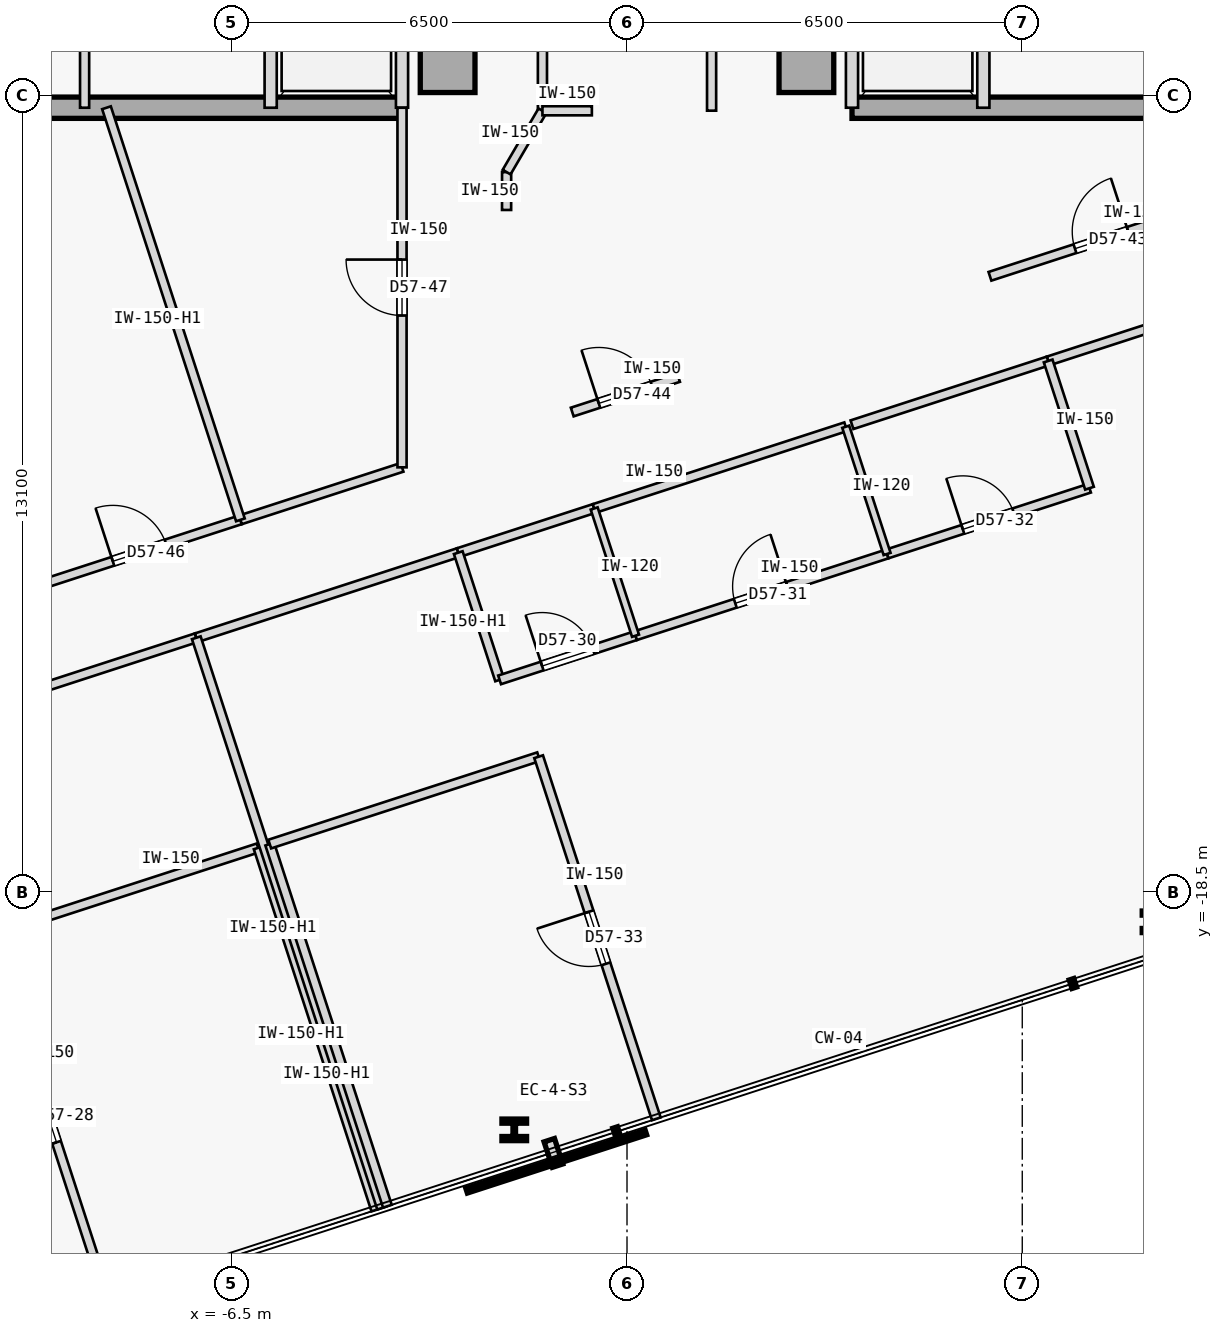
"""IFC4 building model, lengths in metres.
Left out: names, types, materials, properties, quantities, classifications, styles, units other than length and angle.
Written with IfcOpenShell. Run it as: python <this file> out.ifc"""

import sys

from ifc_helpers import new_model, si_unit, direction, frame, frame_2d, origin, origin_2d, place, context, subcontext, project, spatial, rectangle, i_section, extrude, element, fill, save


model = new_model("IFC4")
c1 = context("Model", 3, precision=1e-05, world=origin(), true_north=direction((0.0, 1.0)))
c2 = subcontext(c1, "Body", "Model", "MODEL_VIEW")
j1 = project(units=[si_unit("LENGTHUNIT", "METRE"), si_unit("PLANEANGLEUNIT", "RADIAN")], contexts=[c1])
p1 = place(None, origin())
s1 = spatial("IfcSite", under=j1, at=p1, CompositionType="ELEMENT")
p2 = place(p1, origin())
s2 = spatial("IfcBuilding", under=s1, at=p2, CompositionType="ELEMENT")
p3 = place(p2, frame((0.0, 0.0, 217.6)))
s3 = spatial("IfcBuildingStorey", under=s2, at=p3, CompositionType="ELEMENT", Elevation=217.6)
for number, where, z_axis, x_axis in (
    (1, (-2.95, -4.9, 0.0), (0.0, 0.0, 1.0), (1.0, 0.0, 0.0)),
    (2, (2.95, -4.9, 0.0), (0.0, 0.0, 1.0), (1.0, 0.0, 0.0)),
):
    element("IfcColumn", number, at=place(p3, frame(where, z_axis=z_axis, x_axis=x_axis)), inside=s3, PredefinedType="COLUMN", context=c2, shape_type="SweptSolid", body=[
        extrude(rectangle(XDim=0.9, YDim=0.9, at=origin_2d()), origin(), (0.0, 0.0, 1.0), 3.35),
    ])
for number, where, z_axis, x_axis in (
    (3, (-14.56, -5.6, 0.0), (0.0, 0.0, 1.0), (1.0, 0.0, 0.0)),
    (4, (3.7, -5.6, 0.0), (0.0, 0.0, 1.0), (1.0, 0.0, 0.0)),
):
    element("IfcWall", number, at=place(p3, frame(where, z_axis=z_axis, x_axis=x_axis)), inside=s3, PredefinedType="SHEAR", context=c2, shape_type="SweptSolid", body=[
        extrude(rectangle(XDim=10.86, YDim=0.35, at=frame_2d((5.43, 0.0))), origin(), (0.0, 0.0, 1.0), 3.125),
    ])
for number, where, z_axis, x_axis in (
    (5, (-1.854, -22.409, 0.0), (0.0, 0.0, 1.0), (1.0, 0.0, 0.0)),
    (6, (8.675, -18.988, 0.0), (0.0, 0.0, 1.0), (1.0, 0.0, 0.0)),
):
    element("IfcColumn", number, at=place(p3, frame(where, z_axis=z_axis, x_axis=x_axis)), inside=s3, PredefinedType="COLUMN", context=c2, shape_type="SweptSolid", body=[
        extrude(i_section(OverallWidth=0.405, OverallDepth=0.355, WebThickness=0.042, FlangeThickness=0.068, FilletRadius=0.015, at=origin_2d()), origin(), (0.0, 0.0, 1.0), 3.35),
    ])
for number, where, z_axis, x_axis in (
    (7, (-3.7, -5.6, 0.0), (0.0, 0.0, 1.0), (0.0, 1.0, 0.0)),
    (8, (-5.86, -5.6, 0.0), (0.0, 0.0, 1.0), (0.0, 1.0, 0.0)),
    (9, (3.7, -5.6, 0.0), (0.0, 0.0, 1.0), (0.0, 1.0, 0.0)),
    (10, (5.86, -5.6, 0.0), (0.0, 0.0, 1.0), (0.0, 1.0, 0.0)),
):
    element("IfcWall", number, at=place(p3, frame(where, z_axis=z_axis, x_axis=x_axis)), inside=s3, PredefinedType="STANDARD", context=c2, shape_type="SweptSolid", body=[
        extrude(rectangle(XDim=2.65, YDim=0.2, at=frame_2d((1.325, 0.0))), origin(), (0.0, 0.0, 1.0), 3.125),
    ])
p4 = place(p3, frame((-8.92, -5.6, 0.0), z_axis=(0.0, 0.0, 1.0), x_axis=(0.0, 1.0, 0.0)))
e11 = element("IfcWall", 11, at=p4, inside=s3, PredefinedType="PARTITIONING", context=c2, shape_type="SweptSolid", body=[
    extrude(rectangle(XDim=2.65, YDim=0.15, at=frame_2d((1.325, 0.0))), origin(), (0.0, 0.0, 1.0), 3.125),
])
p5 = place(p3, frame((-1.391, -5.65, 0.0), z_axis=(0.0, 0.0, 1.0), x_axis=(-8.6422954e-05, 0.999999996266, 0.0)))
e12 = element("IfcWall", 12, at=p5, inside=s3, PredefinedType="PARTITIONING", context=c2, shape_type="SweptSolid", body=[
    extrude(rectangle(XDim=11.3, YDim=0.15, at=frame_2d((5.65, 0.0))), origin(), (0.0, 0.0, 1.0), 3.125),
])
p6 = place(p5, frame((5.175, 0.0, 0.0)))
e13 = element("IfcOpeningElement", 13, at=p6, cuts=e12, PredefinedType="OPENING", context=c2, shape_type="SweptSolid", body=[
    extrude(rectangle(XDim=0.95, YDim=2.15, at=frame_2d((0.475, 1.075))), frame((0.0, 0.085, 0.0), z_axis=(0.0, -1.0, 0.0), x_axis=(1.0, 0.0, 0.0)), (0.0, 0.0, 1.0), 0.17),
])
p7 = place(p3, frame((1.391, -5.648, 0.0), z_axis=(0.0, 0.0, 1.0), x_axis=(-4.3218947e-05, 0.999999999066, 0.0)))
e14 = element("IfcWall", 14, at=p7, inside=s3, PredefinedType="PARTITIONING", context=c2, shape_type="SweptSolid", body=[
    extrude(rectangle(XDim=11.298, YDim=0.15, at=frame_2d((5.649, 0.0))), origin(), (0.0, 0.0, 1.0), 3.125),
])
p8 = place(p3, frame((-14.349, -16.677, 0.0), z_axis=(0.0, 0.0, 1.0), x_axis=(0.951058958043, 0.309009479345, 0.0)))
e15 = element("IfcWall", 15, at=p8, inside=s3, PredefinedType="PARTITIONING", context=c2, shape_type="SweptSolid", body=[
    extrude(rectangle(XDim=7.64, YDim=0.15, at=frame_2d((3.82, 0.0))), origin(), (0.0, 0.0, 1.0), 3.125),
])
p9 = place(p8, frame((3.345, 0.0, 0.0)))
e16 = element("IfcOpeningElement", 16, at=p9, cuts=e15, PredefinedType="OPENING", context=c2, shape_type="SweptSolid", body=[
    extrude(rectangle(XDim=0.95, YDim=2.15, at=frame_2d((0.475, 1.075))), frame((0.0, 0.085, 0.0), z_axis=(0.0, -1.0, 0.0), x_axis=(1.0, 0.0, 0.0)), (0.0, 0.0, 1.0), 0.17),
])
p10 = place(p3, frame((-7.083, -14.316, 0.0), z_axis=(0.0, 0.0, 1.0), x_axis=(0.951054265246, 0.309023922305, 0.0)))
e17 = element("IfcWall", 17, at=p10, inside=s3, PredefinedType="PARTITIONING", context=c2, shape_type="SweptSolid", body=[
    extrude(rectangle(XDim=4.53, YDim=0.15, at=frame_2d((2.265, 0.0))), origin(), (0.0, 0.0, 1.0), 3.125),
])
p11 = place(p3, frame((6.926, -9.765, 0.0), z_axis=(0.0, 0.0, 1.0), x_axis=(0.951054878391, 0.30902203528, 0.0)))
e18 = element("IfcWall", 18, at=p11, inside=s3, PredefinedType="PARTITIONING", context=c2, shape_type="SweptSolid", body=[
    extrude(rectangle(XDim=5.862, YDim=0.15, at=frame_2d((2.931, 0.0))), origin(), (0.0, 0.0, 1.0), 3.125),
])
p12 = place(p11, frame((2.456, 0.0, 0.0)))
e19 = element("IfcOpeningElement", 19, at=p12, cuts=e18, PredefinedType="OPENING", context=c2, shape_type="SweptSolid", body=[
    extrude(rectangle(XDim=0.95, YDim=2.15, at=frame_2d((0.475, 1.075))), frame((0.0, 0.085, 0.0), z_axis=(0.0, -1.0, 0.0), x_axis=(1.0, 0.0, 0.0)), (0.0, 0.0, 1.0), 0.17),
])
p13 = place(p3, frame((-2.775, -12.917, 0.0), z_axis=(0.0, 0.0, 1.0), x_axis=(0.951066131077, 0.308987401554, 0.0)))
e20 = element("IfcWall", 20, at=p13, inside=s3, PredefinedType="PARTITIONING", context=c2, shape_type="SweptSolid", body=[
    extrude(rectangle(XDim=2.35, YDim=0.15, at=frame_2d((1.175, 0.0))), origin(), (0.0, 0.0, 1.0), 3.125),
])
p14 = place(p3, frame((-0.54, -12.19, 0.0), z_axis=(0.0, 0.0, 1.0), x_axis=(0.951057987102, 0.309012467661, 0.0)))
e21 = element("IfcWall", 21, at=p14, inside=s3, PredefinedType="PARTITIONING", context=c2, shape_type="SweptSolid", body=[
    extrude(rectangle(XDim=4.35, YDim=0.15, at=frame_2d((2.175, 0.0))), origin(), (0.0, 0.0, 1.0), 3.125),
])
p15 = place(p3, frame((3.7, -10.813, 0.0), z_axis=(0.0, 0.0, 1.0), x_axis=(0.95106685659, 0.308985168408, 0.0)))
e22 = element("IfcWall", 22, at=p15, inside=s3, PredefinedType="PARTITIONING", context=c2, shape_type="SweptSolid", body=[
    extrude(rectangle(XDim=3.392, YDim=0.15, at=frame_2d((1.696, 0.0))), origin(), (0.0, 0.0, 1.0), 3.125),
])
p16 = place(p3, frame((5.969, -8.372, 0.0), z_axis=(0.0, 0.0, 1.0), x_axis=(0.951053123415, 0.309027436391, 0.0)))
e23 = element("IfcWall", 23, at=p16, inside=s3, PredefinedType="PARTITIONING", context=c2, shape_type="SweptSolid", body=[
    extrude(rectangle(XDim=3.86, YDim=0.15, at=frame_2d((1.93, 0.0))), origin(), (0.0, 0.0, 1.0), 3.125),
])
p17 = place(p16, frame((1.47, 0.0, 0.0)))
e24 = element("IfcOpeningElement", 24, at=p17, cuts=e23, PredefinedType="OPENING", context=c2, shape_type="SweptSolid", body=[
    extrude(rectangle(XDim=0.92, YDim=2.15, at=frame_2d((0.46, 1.075))), frame((0.0, 0.085, 0.0), z_axis=(0.0, -1.0, 0.0), x_axis=(1.0, 0.0, 0.0)), (0.0, 0.0, 1.0), 0.17),
])
p18 = place(p3, frame((-0.901, -10.604, 0.0), z_axis=(0.0, 0.0, 1.0), x_axis=(0.951085784807, 0.308926900637, 0.0)))
e25 = element("IfcWall", 25, at=p18, inside=s3, PredefinedType="PARTITIONING", context=c2, shape_type="SweptSolid", body=[
    extrude(rectangle(XDim=1.838, YDim=0.15, at=frame_2d((0.919, 0.0))), origin(), (0.0, 0.0, 1.0), 3.125),
])
p19 = place(p18, frame((0.459, 0.0, 0.0)))
e26 = element("IfcOpeningElement", 26, at=p19, cuts=e25, PredefinedType="OPENING", context=c2, shape_type="SweptSolid", body=[
    extrude(rectangle(XDim=0.92, YDim=2.15, at=frame_2d((0.46, 1.075))), frame((0.0, 0.085, 0.0), z_axis=(0.0, -1.0, 0.0), x_axis=(1.0, 0.0, 0.0)), (0.0, 0.0, 1.0), 0.17),
])
p20 = place(p3, frame((-1.98, -7.281, 0.0), z_axis=(0.0, 0.0, 1.0), x_axis=(0.000784313484, 0.999999692426, 0.0)))
e27 = element("IfcWall", 27, at=p20, inside=s3, PredefinedType="PARTITIONING", context=c2, shape_type="SweptSolid", body=[
    extrude(rectangle(XDim=0.623, YDim=0.15, at=frame_2d((0.311, 0.0))), origin(), (0.0, 0.0, 1.0), 3.125),
])
p21 = place(p3, frame((-1.98, -6.659, 0.0), z_axis=(0.0, 0.0, 1.0), x_axis=(0.504533622976, 0.863392044952, 0.0)))
e28 = element("IfcWall", 28, at=p21, inside=s3, PredefinedType="PARTITIONING", context=c2, shape_type="SweptSolid", body=[
    extrude(rectangle(XDim=1.168, YDim=0.15, at=frame_2d((0.584, 0.0))), origin(), (0.0, 0.0, 1.0), 3.125),
])
p22 = place(p3, frame((-9.679, -13.457, 0.0), z_axis=(0.0, 0.0, 1.0), x_axis=(0.951054104561, 0.309024416831, 0.0)))
e29 = element("IfcWall", 29, at=p22, inside=s3, PredefinedType="PARTITIONING", context=c2, shape_type="SweptSolid", body=[
    extrude(rectangle(XDim=3.492, YDim=0.15, at=frame_2d((1.746, 0.0))), origin(), (0.0, 0.0, 1.0), 3.125),
])
p23 = place(p22, frame((1.286, 0.0, 0.0)))
e30 = element("IfcOpeningElement", 30, at=p23, cuts=e29, PredefinedType="OPENING", context=c2, shape_type="SweptSolid", body=[
    extrude(rectangle(XDim=0.92, YDim=2.15, at=frame_2d((0.46, 1.075))), frame((0.0, 0.085, 0.0), z_axis=(0.0, -1.0, 0.0), x_axis=(1.0, 0.0, 0.0)), (0.0, 0.0, 1.0), 0.17),
])
p24 = place(p3, frame((-6.358, -12.377, 0.0), z_axis=(0.0, 0.0, 1.0), x_axis=(0.951049473261, 0.309038669765, 0.0)))
e31 = element("IfcWall", 31, at=p24, inside=s3, PredefinedType="PARTITIONING", context=c2, shape_type="SweptSolid", body=[
    extrude(rectangle(XDim=2.795, YDim=0.15, at=frame_2d((1.397, 0.0))), origin(), (0.0, 0.0, 1.0), 3.125),
])
p25 = place(p3, frame((-3.7, -11.514, 0.0), z_axis=(0.0, 0.0, 1.0), x_axis=(-8.2572974e-05, 0.999999996591, 0.0)))
e32 = element("IfcWall", 32, at=p25, inside=s3, PredefinedType="PARTITIONING", context=c2, shape_type="SweptSolid", body=[
    extrude(rectangle(XDim=5.913, YDim=0.15, at=frame_2d((2.957, 0.0))), origin(), (0.0, 0.0, 1.0), 3.125),
])
p26 = place(p25, frame((2.497, 0.0, 0.0)))
e33 = element("IfcOpeningElement", 33, at=p26, cuts=e32, PredefinedType="OPENING", context=c2, shape_type="SweptSolid", body=[
    extrude(rectangle(XDim=0.92, YDim=2.15, at=frame_2d((0.46, 1.075))), frame((0.0, 0.085, 0.0), z_axis=(0.0, -1.0, 0.0), x_axis=(1.0, 0.0, 0.0)), (0.0, 0.0, 1.0), 0.17),
])
p27 = place(p3, frame((-1.391, -5.65, 0.0), z_axis=(0.0, 0.0, 1.0), x_axis=(0.999999954883, 0.000300390494, 0.0)))
e34 = element("IfcWall", 34, at=p27, inside=s3, PredefinedType="PARTITIONING", context=c2, shape_type="SweptSolid", body=[
    extrude(rectangle(XDim=0.813, YDim=0.15, at=frame_2d((0.406, 0.0))), origin(), (0.0, 0.0, 1.0), 3.125),
])
p28 = place(p3, frame((-8.553, -25.164, 0.0), z_axis=(0.0, 0.0, 1.0), x_axis=(-0.309013782848, 0.951057559777, 0.0)))
e35 = element("IfcWall", 35, at=p28, inside=s3, PredefinedType="PARTITIONING", context=c2, shape_type="SweptSolid", body=[
    extrude(rectangle(XDim=6.262, YDim=0.15, at=frame_2d((3.131, 0.0))), origin(), (0.0, 0.0, 1.0), 3.125),
])
p29 = place(p28, frame((2.681, 0.0, 0.0)))
e36 = element("IfcOpeningElement", 36, at=p29, cuts=e35, PredefinedType="OPENING", context=c2, shape_type="SweptSolid", body=[
    extrude(rectangle(XDim=0.9, YDim=2.15, at=frame_2d((0.45, 1.075))), frame((0.0, 0.085, 0.0), z_axis=(0.0, -1.0, 0.0), x_axis=(1.0, 0.0, 0.0)), (0.0, 0.0, 1.0), 0.17),
])
p30 = place(p3, frame((-10.488, -19.208, 0.0), z_axis=(0.0, 0.0, 1.0), x_axis=(0.951050272606, 0.309036209813, 0.0)))
e37 = element("IfcWall", 37, at=p30, inside=s3, PredefinedType="PARTITIONING", context=c2, shape_type="SweptSolid", body=[
    extrude(rectangle(XDim=4.65, YDim=0.15, at=frame_2d((2.325, 0.0))), origin(), (0.0, 0.0, 1.0), 3.125),
])
p31 = place(p3, frame((-4.131, -23.727, 0.0), z_axis=(0.0, 0.0, 1.0), x_axis=(-0.309013782848, 0.951057559777, 0.0)))
e38 = element("IfcWall", 38, at=p31, inside=s3, PredefinedType="PARTITIONING", context=c2, shape_type="SweptSolid", body=[
    extrude(rectangle(XDim=6.262, YDim=0.15, at=frame_2d((3.131, 0.0))), origin(), (0.0, 0.0, 1.0), 2.675),
])
p32 = place(p3, frame((-4.036, -23.696, 0.0), z_axis=(0.0, 0.0, 1.0), x_axis=(-0.309022258842, 0.95105480575, 0.0)))
e39 = element("IfcWall", 39, at=p32, inside=s3, PredefinedType="PARTITIONING", context=c2, shape_type="SweptSolid", body=[
    extrude(rectangle(XDim=9.862, YDim=0.15, at=frame_2d((4.931, 0.0))), origin(), (0.0, 0.0, 1.0), 2.675),
])
p33 = place(p3, frame((-2.095, -15.009, 0.0), z_axis=(0.0, 0.0, 1.0), x_axis=(-0.308960600764, 0.951074837842, 0.0)))
e40 = element("IfcWall", 40, at=p33, inside=s3, PredefinedType="PARTITIONING", context=c2, shape_type="SweptSolid", body=[
    extrude(rectangle(XDim=2.2, YDim=0.15, at=frame_2d((1.1, 0.0))), origin(), (0.0, 0.0, 1.0), 2.675),
])
p34 = place(p3, frame((-2.095, -15.009, 0.0), z_axis=(0.0, 0.0, 1.0), x_axis=(0.951076048914, 0.308956872689, 0.0)))
e41 = element("IfcWall", 41, at=p34, inside=s3, PredefinedType="PARTITIONING", context=c2, shape_type="SweptSolid", body=[
    extrude(rectangle(XDim=2.35, YDim=0.15, at=frame_2d((1.175, 0.0))), origin(), (0.0, 0.0, 1.0), 3.125),
])
p35 = place(p34, frame((0.735, 0.0, 0.0)))
e42 = element("IfcOpeningElement", 42, at=p35, cuts=e41, PredefinedType="OPENING", context=c2, shape_type="SweptSolid", body=[
    extrude(rectangle(XDim=0.88, YDim=2.15, at=frame_2d((0.44, 1.075))), frame((0.0, 0.085, 0.0), z_axis=(0.0, -1.0, 0.0), x_axis=(1.0, 0.0, 0.0)), (0.0, 0.0, 1.0), 0.17),
])
p36 = place(p3, frame((0.14, -14.283, 0.0), z_axis=(0.0, 0.0, 1.0), x_axis=(0.951057987102, 0.309012467661, 0.0)))
e43 = element("IfcWall", 43, at=p36, inside=s3, PredefinedType="PARTITIONING", context=c2, shape_type="SweptSolid", body=[
    extrude(rectangle(XDim=4.35, YDim=0.15, at=frame_2d((2.175, 0.0))), origin(), (0.0, 0.0, 1.0), 3.125),
])
p37 = place(p36, frame((1.725, 0.0, 0.0)))
e44 = element("IfcOpeningElement", 44, at=p37, cuts=e43, PredefinedType="OPENING", context=c2, shape_type="SweptSolid", body=[
    extrude(rectangle(XDim=0.9, YDim=2.15, at=frame_2d((0.45, 1.075))), frame((0.0, 0.085, 0.0), z_axis=(0.0, -1.0, 0.0), x_axis=(1.0, 0.0, 0.0)), (0.0, 0.0, 1.0), 0.17),
])
p38 = place(p3, frame((4.277, -12.938, 0.0), z_axis=(0.0, 0.0, 1.0), x_axis=(0.951055596592, 0.309019824916, 0.0)))
e45 = element("IfcWall", 45, at=p38, inside=s3, PredefinedType="PARTITIONING", context=c2, shape_type="SweptSolid", body=[
    extrude(rectangle(XDim=3.5, YDim=0.15, at=frame_2d((1.75, 0.0))), origin(), (0.0, 0.0, 1.0), 3.125),
])
p39 = place(p38, frame((1.31, 0.0, 0.0)))
e46 = element("IfcOpeningElement", 46, at=p39, cuts=e45, PredefinedType="OPENING", context=c2, shape_type="SweptSolid", body=[
    extrude(rectangle(XDim=0.88, YDim=2.15, at=frame_2d((0.44, 1.075))), frame((0.0, 0.085, 0.0), z_axis=(0.0, -1.0, 0.0), x_axis=(1.0, 0.0, 0.0)), (0.0, 0.0, 1.0), 0.17),
])
p40 = place(p3, frame((7.606, -11.857, 0.0), z_axis=(0.0, 0.0, 1.0), x_axis=(-0.309060979314, 0.951042223598, 0.0)))
e47 = element("IfcWall", 47, at=p40, inside=s3, PredefinedType="PARTITIONING", context=c2, shape_type="SweptSolid", body=[
    extrude(rectangle(XDim=2.2, YDim=0.15, at=frame_2d((1.1, 0.0))), origin(), (0.0, 0.0, 1.0), 3.125),
])
p41 = place(p3, frame((-3.941, -23.665, 0.0), z_axis=(0.0, 0.0, 1.0), x_axis=(-0.309013782848, 0.951057559777, 0.0)))
e48 = element("IfcWall", 48, at=p41, inside=s3, PredefinedType="PARTITIONING", context=c2, shape_type="SweptSolid", body=[
    extrude(rectangle(XDim=6.262, YDim=0.15, at=frame_2d((3.131, 0.0))), origin(), (0.0, 0.0, 1.0), 2.675),
])
p42 = place(p3, frame((-5.876, -17.709, 0.0), z_axis=(0.0, 0.0, 1.0), x_axis=(0.951065702951, 0.308988719326, 0.0)))
e49 = element("IfcWall", 49, at=p42, inside=s3, PredefinedType="PARTITIONING", context=c2, shape_type="SweptSolid", body=[
    extrude(rectangle(XDim=4.65, YDim=0.15, at=frame_2d((2.325, 0.0))), origin(), (0.0, 0.0, 1.0), 3.125),
])
p43 = place(p3, frame((0.482, -22.228, 0.0), z_axis=(0.0, 0.0, 1.0), x_axis=(-0.30902524124, 0.951053836687, 0.0)))
e50 = element("IfcWall", 50, at=p43, inside=s3, PredefinedType="PARTITIONING", context=c2, shape_type="SweptSolid", body=[
    extrude(rectangle(XDim=6.262, YDim=0.15, at=frame_2d((3.131, 0.0))), origin(), (0.0, 0.0, 1.0), 3.125),
])
p44 = place(p43, frame((2.681, 0.0, 0.0)))
e51 = element("IfcOpeningElement", 51, at=p44, cuts=e50, PredefinedType="OPENING", context=c2, shape_type="SweptSolid", body=[
    extrude(rectangle(XDim=0.9, YDim=2.15, at=frame_2d((0.45, 1.075))), frame((0.0, 0.085, 0.0), z_axis=(0.0, -1.0, 0.0), x_axis=(1.0, 0.0, 0.0)), (0.0, 0.0, 1.0), 0.17),
])
for number, where, z_axis, x_axis in (
    (52, (0.14, -14.283, 0.0), (0.0, 0.0, 1.0), (-0.309, 0.951, 0.0)),
    (53, (4.277, -12.938, 0.0), (0.0, 0.0, 1.0), (-0.309, 0.951, 0.0)),
):
    element("IfcWall", number, at=place(p3, frame(where, z_axis=z_axis, x_axis=x_axis)), inside=s3, PredefinedType="PARTITIONING", context=c2, shape_type="SweptSolid", body=[
        extrude(rectangle(XDim=2.2, YDim=0.12, at=frame_2d((1.1, 0.0))), origin(), (0.0, 0.0, 1.0), 3.125),
    ])
p45 = place(p3, frame((-6.358, -12.377, 0.0), z_axis=(0.0, 0.0, 1.0), x_axis=(-0.309024097906, 0.951054208189, 0.0)))
e54 = element("IfcWall", 54, at=p45, inside=s3, PredefinedType="PARTITIONING", context=c2, shape_type="SweptSolid", body=[
    extrude(rectangle(XDim=7.126, YDim=0.15, at=frame_2d((3.563, 0.0))), origin(), (0.0, 0.0, 1.0), 2.675),
])
p46 = place(p29, origin())
e55 = element("IfcDoor", 55, at=p46, inside=s3, OperationType="SINGLE_SWING_LEFT", PredefinedType="DOOR", context=c2, shape_type="SweptSolid", body=[
    extrude(rectangle(XDim=0.9, YDim=2.15, at=frame_2d((0.45, 1.075))), frame((0.0, 0.025, 0.0), z_axis=(0.0, -1.0, 0.0), x_axis=(1.0, 0.0, 0.0)), (0.0, 0.0, 1.0), 0.05),
])
fill(e36, e55)
p47 = place(p35, origin())
e56 = element("IfcDoor", 56, at=p47, inside=s3, OperationType="SINGLE_SWING_LEFT", PredefinedType="DOOR", context=c2, shape_type="SweptSolid", body=[
    extrude(rectangle(XDim=0.88, YDim=2.15, at=frame_2d((0.44, 1.075))), frame((0.0, 0.025, 0.0), z_axis=(0.0, -1.0, 0.0), x_axis=(1.0, 0.0, 0.0)), (0.0, 0.0, 1.0), 0.05),
])
fill(e42, e56)
p48 = place(p37, origin())
e57 = element("IfcDoor", 57, at=p48, inside=s3, OperationType="SINGLE_SWING_RIGHT", PredefinedType="DOOR", context=c2, shape_type="SweptSolid", body=[
    extrude(rectangle(XDim=0.9, YDim=2.15, at=frame_2d((0.45, 1.075))), frame((0.0, 0.025, 0.0), z_axis=(0.0, -1.0, 0.0), x_axis=(1.0, 0.0, 0.0)), (0.0, 0.0, 1.0), 0.05),
])
fill(e44, e57)
p49 = place(p39, origin())
e58 = element("IfcDoor", 58, at=p49, inside=s3, OperationType="SINGLE_SWING_LEFT", PredefinedType="DOOR", context=c2, shape_type="SweptSolid", body=[
    extrude(rectangle(XDim=0.88, YDim=2.15, at=frame_2d((0.44, 1.075))), frame((0.0, 0.025, 0.0), z_axis=(0.0, -1.0, 0.0), x_axis=(1.0, 0.0, 0.0)), (0.0, 0.0, 1.0), 0.05),
])
fill(e46, e58)
p50 = place(p44, origin())
e59 = element("IfcDoor", 59, at=p50, inside=s3, OperationType="SINGLE_SWING_RIGHT", PredefinedType="DOOR", context=c2, shape_type="SweptSolid", body=[
    extrude(rectangle(XDim=0.9, YDim=2.15, at=frame_2d((0.45, 1.075))), frame((0.0, 0.025, 0.0), z_axis=(0.0, -1.0, 0.0), x_axis=(1.0, 0.0, 0.0)), (0.0, 0.0, 1.0), 0.05),
])
fill(e51, e59)
p51 = place(p17, origin())
e60 = element("IfcDoor", 60, at=p51, inside=s3, OperationType="SINGLE_SWING_RIGHT", PredefinedType="DOOR", context=c2, shape_type="SweptSolid", body=[
    extrude(rectangle(XDim=0.92, YDim=2.15, at=frame_2d((0.46, 1.075))), frame((0.0, 0.025, 0.0), z_axis=(0.0, -1.0, 0.0), x_axis=(1.0, 0.0, 0.0)), (0.0, 0.0, 1.0), 0.05),
])
fill(e24, e60)
p52 = place(p19, origin())
e61 = element("IfcDoor", 61, at=p52, inside=s3, OperationType="SINGLE_SWING_LEFT", PredefinedType="DOOR", context=c2, shape_type="SweptSolid", body=[
    extrude(rectangle(XDim=0.92, YDim=2.15, at=frame_2d((0.46, 1.075))), frame((0.0, 0.025, 0.0), z_axis=(0.0, -1.0, 0.0), x_axis=(1.0, 0.0, 0.0)), (0.0, 0.0, 1.0), 0.05),
])
fill(e26, e61)
p53 = place(p23, origin())
e62 = element("IfcDoor", 62, at=p53, inside=s3, OperationType="SINGLE_SWING_LEFT", PredefinedType="DOOR", context=c2, shape_type="SweptSolid", body=[
    extrude(rectangle(XDim=0.92, YDim=2.15, at=frame_2d((0.46, 1.075))), frame((0.0, 0.025, 0.0), z_axis=(0.0, -1.0, 0.0), x_axis=(1.0, 0.0, 0.0)), (0.0, 0.0, 1.0), 0.05),
])
fill(e30, e62)
p54 = place(p26, origin())
e63 = element("IfcDoor", 63, at=p54, inside=s3, OperationType="SINGLE_SWING_RIGHT", PredefinedType="DOOR", context=c2, shape_type="SweptSolid", body=[
    extrude(rectangle(XDim=0.92, YDim=2.15, at=frame_2d((0.46, 1.075))), frame((0.0, 0.025, 0.0), z_axis=(0.0, -1.0, 0.0), x_axis=(1.0, 0.0, 0.0)), (0.0, 0.0, 1.0), 0.05),
])
fill(e33, e63)
save(model, sys.argv[1])
